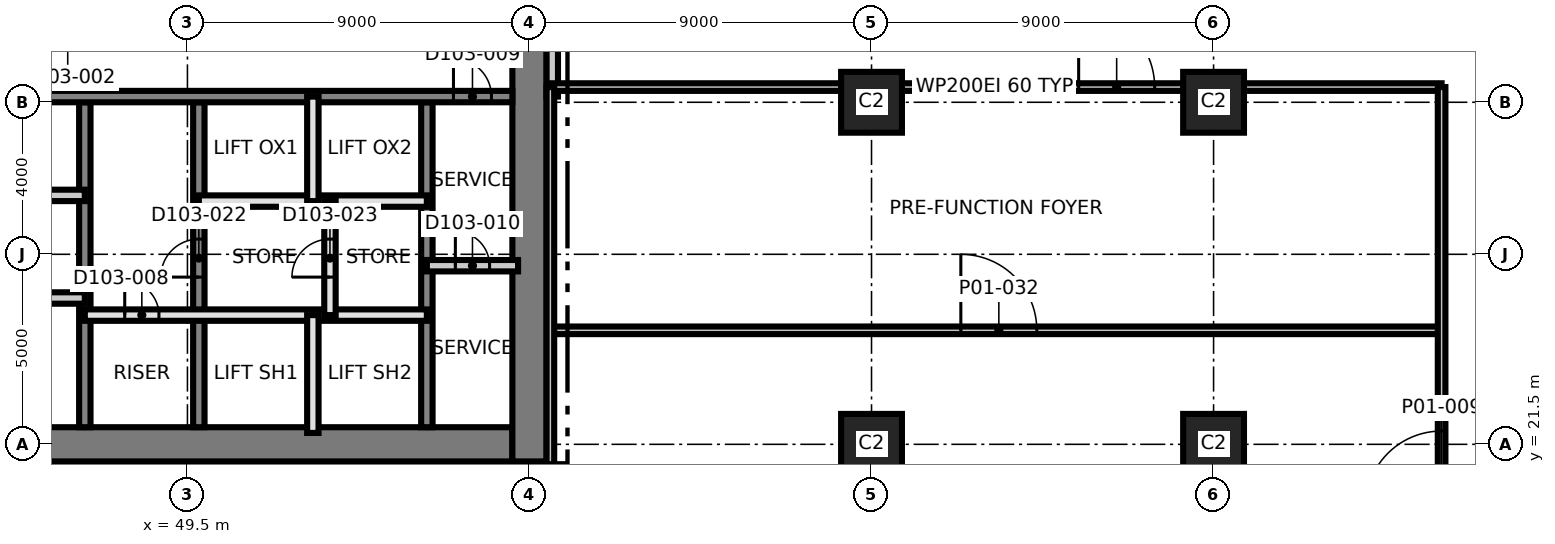
"""IFC4 building model, lengths in metres.
Left out: names, types, materials, properties, quantities, classifications, styles, units other than length and angle.
Written with IfcOpenShell. Run it as: python <this file> out.ifc"""

import sys

from ifc_helpers import new_model, si_unit, direction, frame, frame_2d, origin, origin_2d, place, context, subcontext, project, spatial, rectangle, extrude, element, fill, save


model = new_model("IFC4")
c1 = context("Model", 3, precision=1e-05, world=origin(), true_north=direction((0.0, 1.0)))
c2 = subcontext(c1, "Body", "Model", "MODEL_VIEW")
j1 = project(units=[si_unit("LENGTHUNIT", "METRE"), si_unit("PLANEANGLEUNIT", "RADIAN")], contexts=[c1])
p1 = place(None, origin())
s1 = spatial("IfcSite", under=j1, at=p1, CompositionType="ELEMENT")
p2 = place(p1, origin())
s2 = spatial("IfcBuilding", under=s1, at=p2, CompositionType="ELEMENT")
p3 = place(p2, frame((0.0, 0.0, 8.0)))
s3 = spatial("IfcBuildingStorey", under=s2, at=p3, CompositionType="ELEMENT", Elevation=8.0)
p4 = place(p3, frame((31.05, 21.5, 0.0), z_axis=(0.0, 0.0, 1.0), x_axis=(1.0, 0.0, 0.0)))
e1 = element("IfcWall", 1, at=p4, inside=s3, PredefinedType="SHEAR", context=c2, shape_type="SweptSolid", body=[
    extrude(rectangle(XDim=27.0, YDim=0.9, at=frame_2d((13.5, 0.0))), origin(), (0.0, 0.0, 1.0), 5.5),
])
p5 = place(p3, frame((58.5, 21.05, 0.0), z_axis=(0.0, 0.0, 1.0), x_axis=(0.0, 1.0, 0.0)))
e2 = element("IfcWall", 2, at=p5, inside=s3, PredefinedType="SHEAR", context=c2, shape_type="SweptSolid", body=[
    extrude(rectangle(XDim=18.9, YDim=0.9, at=frame_2d((9.45, 0.0))), origin(), (0.0, 0.0, 1.0), 5.5),
])
p6 = place(p3, frame((46.8, 21.95, 0.0), z_axis=(0.0, 0.0, 1.0), x_axis=(0.0, 1.0, 0.0)))
e3 = element("IfcWall", 3, at=p6, inside=s3, PredefinedType="SHEAR", context=c2, shape_type="SweptSolid", body=[
    extrude(rectangle(XDim=8.55, YDim=0.3, at=frame_2d((4.275, 0.0))), origin(), (0.0, 0.0, 1.0), 5.5),
])
p7 = place(p3, frame((49.8, 21.95, 0.0), z_axis=(0.0, 0.0, 1.0), x_axis=(0.0, 1.0, 0.0)))
e4 = element("IfcWall", 4, at=p7, inside=s3, PredefinedType="SHEAR", context=c2, shape_type="SweptSolid", body=[
    extrude(rectangle(XDim=8.55, YDim=0.3, at=frame_2d((4.275, 0.0))), origin(), (0.0, 0.0, 1.0), 5.5),
])
p8 = place(p7, frame((3.95, 0.0, 0.0)))
e5 = element("IfcOpeningElement", 5, at=p8, cuts=e4, PredefinedType="OPENING", context=c2, shape_type="SweptSolid", body=[
    extrude(rectangle(XDim=1.0, YDim=2.1, at=frame_2d((0.5, 1.05))), frame((0.0, 0.16, 0.0), z_axis=(0.0, -1.0, 0.0), x_axis=(1.0, 0.0, 0.0)), (0.0, 0.0, 1.0), 0.32),
])
p9 = place(p3, frame((55.8, 21.95, 0.0), z_axis=(0.0, 0.0, 1.0), x_axis=(0.0, 1.0, 0.0)))
e6 = element("IfcWall", 6, at=p9, inside=s3, PredefinedType="SHEAR", context=c2, shape_type="SweptSolid", body=[
    extrude(rectangle(XDim=8.55, YDim=0.3, at=frame_2d((4.275, 0.0))), origin(), (0.0, 0.0, 1.0), 5.5),
])
p10 = place(p3, frame((31.95, 30.65, 0.0), z_axis=(0.0, 0.0, 1.0), x_axis=(1.0, 0.0, 0.0)))
e7 = element("IfcWall", 7, at=p10, inside=s3, PredefinedType="SHEAR", context=c2, shape_type="SweptSolid", body=[
    extrude(rectangle(XDim=26.1, YDim=0.3, at=frame_2d((13.05, 0.0))), origin(), (0.0, 0.0, 1.0), 5.5),
])
p11 = place(p10, frame((24.55, 0.0, 0.0)))
e8 = element("IfcOpeningElement", 8, at=p11, cuts=e7, PredefinedType="OPENING", context=c2, shape_type="SweptSolid", body=[
    extrude(rectangle(XDim=1.0, YDim=2.1, at=frame_2d((0.5, 1.05))), frame((0.0, 0.16, 0.0), z_axis=(0.0, -1.0, 0.0), x_axis=(1.0, 0.0, 0.0)), (0.0, 0.0, 1.0), 0.32),
])
p12 = place(p10, frame((11.35, 0.0, 0.0)))
e9 = element("IfcOpeningElement", 9, at=p12, cuts=e7, PredefinedType="OPENING", context=c2, shape_type="SweptSolid", body=[
    extrude(rectangle(XDim=1.0, YDim=2.1, at=frame_2d((0.5, 1.05))), frame((0.0, 0.16, 0.0), z_axis=(0.0, -1.0, 0.0), x_axis=(1.0, 0.0, 0.0)), (0.0, 0.0, 1.0), 0.32),
])
for number, where, z_axis, x_axis in (
    (10, (67.5, 21.5, 0.0), (0.0, 0.0, 1.0), (1.0, 0.0, 0.0)),
    (11, (76.5, 21.5, 0.0), (0.0, 0.0, 1.0), (1.0, 0.0, 0.0)),
    (12, (67.5, 30.5, 0.0), (0.0, 0.0, 1.0), (1.0, 0.0, 0.0)),
    (13, (76.5, 30.5, 0.0), (0.0, 0.0, 1.0), (1.0, 0.0, 0.0)),
):
    element("IfcColumn", number, at=place(p3, frame(where, z_axis=z_axis, x_axis=x_axis)), inside=s3, PredefinedType="COLUMN", context=c2, shape_type="SweptSolid", body=[
        extrude(rectangle(XDim=1.6, YDim=1.6, at=origin_2d()), origin(), (0.0, 0.0, 1.0), 5.5),
    ])
p13 = place(p3, frame((46.8, 24.9, 0.0), z_axis=(0.0, 0.0, 1.0), x_axis=(1.0, 0.0, 0.0)))
e14 = element("IfcWall", 14, at=p13, inside=s3, PredefinedType="SOLIDWALL", context=c2, shape_type="SweptSolid", body=[
    extrude(rectangle(XDim=9.0, YDim=0.3, at=frame_2d((4.5, 0.0))), origin(), (0.0, 0.0, 1.0), 5.2),
])
p14 = place(p13, frame((1.05, 0.0, 0.0)))
e15 = element("IfcOpeningElement", 15, at=p14, cuts=e14, PredefinedType="OPENING", context=c2, shape_type="SweptSolid", body=[
    extrude(rectangle(XDim=0.9, YDim=2.1, at=frame_2d((0.45, 1.05))), frame((0.0, 0.16, 0.0), z_axis=(0.0, -1.0, 0.0), x_axis=(1.0, 0.0, 0.0)), (0.0, 0.0, 1.0), 0.32),
])
p15 = place(p3, frame((40.8, 25.35, 0.0), z_axis=(0.0, 0.0, 1.0), x_axis=(1.0, 0.0, 0.0)))
e16 = element("IfcWall", 16, at=p15, inside=s3, PredefinedType="PARTITIONING", context=c2, shape_type="SweptSolid", body=[
    extrude(rectangle(XDim=6.0, YDim=0.3, at=frame_2d((3.0, 0.0))), origin(), (0.0, 0.0, 1.0), 5.2),
])
p16 = place(p15, frame((2.5, 0.0, 0.0)))
e17 = element("IfcOpeningElement", 17, at=p16, cuts=e16, PredefinedType="OPENING", context=c2, shape_type="SweptSolid", body=[
    extrude(rectangle(XDim=1.0, YDim=2.1, at=frame_2d((0.5, 1.05))), frame((0.0, 0.16, 0.0), z_axis=(0.0, -1.0, 0.0), x_axis=(1.0, 0.0, 0.0)), (0.0, 0.0, 1.0), 0.32),
])
p17 = place(p3, frame((55.8, 26.2, 0.0), z_axis=(0.0, 0.0, 1.0), x_axis=(1.0, 0.0, 0.0)))
e18 = element("IfcWall", 18, at=p17, inside=s3, PredefinedType="PARTITIONING", context=c2, shape_type="SweptSolid", body=[
    extrude(rectangle(XDim=2.4, YDim=0.3, at=frame_2d((1.2, 0.0))), origin(), (0.0, 0.0, 1.0), 5.2),
])
p18 = place(p17, frame((0.75, 0.0, 0.0)))
e19 = element("IfcOpeningElement", 19, at=p18, cuts=e18, PredefinedType="OPENING", context=c2, shape_type="SweptSolid", body=[
    extrude(rectangle(XDim=0.9, YDim=2.1, at=frame_2d((0.45, 1.05))), frame((0.0, 0.16, 0.0), z_axis=(0.0, -1.0, 0.0), x_axis=(1.0, 0.0, 0.0)), (0.0, 0.0, 1.0), 0.32),
])
p19 = place(p3, frame((49.8, 27.9, 0.0), z_axis=(0.0, 0.0, 1.0), x_axis=(1.0, 0.0, 0.0)))
e20 = element("IfcWall", 20, at=p19, inside=s3, PredefinedType="SOLIDWALL", context=c2, shape_type="SweptSolid", body=[
    extrude(rectangle(XDim=6.0, YDim=0.3, at=frame_2d((3.0, 0.0))), origin(), (0.0, 0.0, 1.0), 5.2),
])
p20 = place(p3, frame((40.8, 28.05, 0.0), z_axis=(0.0, 0.0, 1.0), x_axis=(1.0, 0.0, 0.0)))
e21 = element("IfcWall", 21, at=p20, inside=s3, PredefinedType="PARTITIONING", context=c2, shape_type="SweptSolid", body=[
    extrude(rectangle(XDim=6.0, YDim=0.3, at=frame_2d((3.0, 0.0))), origin(), (0.0, 0.0, 1.0), 5.2),
])
p21 = place(p3, frame((52.8, 21.8, 0.0), z_axis=(0.0, 0.0, 1.0), x_axis=(0.0, 1.0, 0.0)))
e22 = element("IfcWall", 22, at=p21, inside=s3, PredefinedType="SOLIDWALL", context=c2, shape_type="SweptSolid", body=[
    extrude(rectangle(XDim=3.1, YDim=0.3, at=frame_2d((1.55, 0.0))), origin(), (0.0, 0.0, 1.0), 5.2),
])
p22 = place(p3, frame((52.8, 27.9, 0.0), z_axis=(0.0, 0.0, 1.0), x_axis=(0.0, 1.0, 0.0)))
e23 = element("IfcWall", 23, at=p22, inside=s3, PredefinedType="SOLIDWALL", context=c2, shape_type="SweptSolid", body=[
    extrude(rectangle(XDim=2.75, YDim=0.3, at=frame_2d((1.375, 0.0))), origin(), (0.0, 0.0, 1.0), 5.2),
])
p23 = place(p3, frame((53.25, 24.9, 0.0), z_axis=(0.0, 0.0, 1.0), x_axis=(0.0, 1.0, 0.0)))
e24 = element("IfcWall", 24, at=p23, inside=s3, PredefinedType="SOLIDWALL", context=c2, shape_type="SweptSolid", body=[
    extrude(rectangle(XDim=3.0, YDim=0.3, at=frame_2d((1.5, 0.0))), origin(), (0.0, 0.0, 1.0), 5.2),
])
p24 = place(p23, frame((1.0, 0.0, 0.0)))
e25 = element("IfcOpeningElement", 25, at=p24, cuts=e24, PredefinedType="OPENING", context=c2, shape_type="SweptSolid", body=[
    extrude(rectangle(XDim=1.0, YDim=2.1, at=frame_2d((0.5, 1.05))), frame((0.0, 0.16, 0.0), z_axis=(0.0, -1.0, 0.0), x_axis=(1.0, 0.0, 0.0)), (0.0, 0.0, 1.0), 0.32),
])
p25 = place(p3, frame((59.1, 30.65, 0.0), z_axis=(0.0, 0.0, 1.0), x_axis=(0.0, 1.0, 0.0)))
e26 = element("IfcWall", 26, at=p25, inside=s3, PredefinedType="PARTITIONING", context=c2, shape_type="SweptSolid", body=[
    extrude(rectangle(XDim=2.7, YDim=0.3, at=frame_2d((1.35, 0.0))), origin(), (0.0, 0.0, 1.0), 5.2),
])
p26 = place(p3, frame((59.05, 24.5, 0.0), z_axis=(0.0, 0.0, 1.0), x_axis=(1.0, 0.0, 0.0)))
e27 = element("IfcWall", 27, at=p26, inside=s3, PredefinedType="PARTITIONING", context=c2, shape_type="SweptSolid", body=[
    extrude(rectangle(XDim=23.45, YDim=0.2, at=frame_2d((11.725, 0.0))), origin(), (0.0, 0.0, 1.0), 5.2),
])
p27 = place(p26, frame((10.8, 0.0, 0.0)))
e28 = element("IfcOpeningElement", 28, at=p27, cuts=e27, PredefinedType="OPENING", context=c2, shape_type="SweptSolid", body=[
    extrude(rectangle(XDim=2.0, YDim=2.1, at=frame_2d((1.0, 1.05))), frame((0.0, 0.11, 0.0), z_axis=(0.0, -1.0, 0.0), x_axis=(1.0, 0.0, 0.0)), (0.0, 0.0, 1.0), 0.22),
])
p28 = place(p3, frame((58.97, 30.9, 0.0), z_axis=(0.0, 0.0, 1.0), x_axis=(1.0, 0.0, 0.0)))
e29 = element("IfcWall", 29, at=p28, inside=s3, PredefinedType="PARTITIONING", context=c2, shape_type="SweptSolid", body=[
    extrude(rectangle(XDim=23.53, YDim=0.2, at=frame_2d((11.765, 0.0))), origin(), (0.0, 0.0, 1.0), 5.2),
])
p29 = place(p28, frame((13.98, 0.0, 0.0)))
e30 = element("IfcOpeningElement", 30, at=p29, cuts=e29, PredefinedType="OPENING", context=c2, shape_type="SweptSolid", body=[
    extrude(rectangle(XDim=2.0, YDim=2.4, at=frame_2d((1.0, 1.2))), frame((0.0, 0.11, 0.0), z_axis=(0.0, -1.0, 0.0), x_axis=(1.0, 0.0, 0.0)), (0.0, 0.0, 1.0), 0.22),
])
p30 = place(p3, frame((59.05, 11.07, 0.0), z_axis=(0.0, 0.0, 1.0), x_axis=(0.0, 1.0, 0.0)))
e31 = element("IfcWall", 31, at=p30, inside=s3, PredefinedType="PARTITIONING", context=c2, shape_type="SweptSolid", body=[
    extrude(rectangle(XDim=19.83, YDim=0.2, at=frame_2d((9.915, 0.0))), origin(), (0.0, 0.0, 1.0), 5.2),
])
p31 = place(p3, frame((82.5, 11.07, 0.0), z_axis=(0.0, 0.0, 1.0), x_axis=(0.0, 1.0, 0.0)))
e32 = element("IfcWall", 32, at=p31, inside=s3, PredefinedType="PARTITIONING", context=c2, shape_type="SweptSolid", body=[
    extrude(rectangle(XDim=19.83, YDim=0.2, at=frame_2d((9.915, 0.0))), origin(), (0.0, 0.0, 1.0), 5.2),
])
p32 = place(p31, frame((8.78, 0.0, 0.0)))
e33 = element("IfcOpeningElement", 33, at=p32, cuts=e32, PredefinedType="OPENING", context=c2, shape_type="SweptSolid", body=[
    extrude(rectangle(XDim=2.0, YDim=2.4, at=frame_2d((1.0, 1.2))), frame((0.0, 0.11, 0.0), z_axis=(0.0, -1.0, 0.0), x_axis=(1.0, 0.0, 0.0)), (0.0, 0.0, 1.0), 0.22),
])
p33 = place(p14, origin())
e34 = element("IfcDoor", 34, at=p33, inside=s3, OperationType="SINGLE_SWING_RIGHT", PredefinedType="DOOR", context=c2, shape_type="SweptSolid", body=[
    extrude(rectangle(XDim=0.9, YDim=2.1, at=frame_2d((0.45, 1.05))), frame((0.0, 0.025, 0.0), z_axis=(0.0, -1.0, 0.0), x_axis=(1.0, 0.0, 0.0)), (0.0, 0.0, 1.0), 0.05),
])
fill(e15, e34)
p34 = place(p11, origin())
e35 = element("IfcDoor", 35, at=p34, inside=s3, OperationType="SINGLE_SWING_LEFT", PredefinedType="DOOR", context=c2, shape_type="SweptSolid", body=[
    extrude(rectangle(XDim=1.0, YDim=2.1, at=frame_2d((0.5, 1.05))), frame((0.0, 0.025, 0.0), z_axis=(0.0, -1.0, 0.0), x_axis=(1.0, 0.0, 0.0)), (0.0, 0.0, 1.0), 0.05),
])
fill(e8, e35)
p35 = place(p18, origin())
e36 = element("IfcDoor", 36, at=p35, inside=s3, OperationType="SINGLE_SWING_RIGHT", PredefinedType="DOOR", context=c2, shape_type="SweptSolid", body=[
    extrude(rectangle(XDim=0.9, YDim=2.1, at=frame_2d((0.45, 1.05))), frame((0.0, 0.025, 0.0), z_axis=(0.0, -1.0, 0.0), x_axis=(1.0, 0.0, 0.0)), (0.0, 0.0, 1.0), 0.05),
])
fill(e19, e36)
p36 = place(p8, origin())
e37 = element("IfcDoor", 37, at=p36, inside=s3, OperationType="SINGLE_SWING_RIGHT", PredefinedType="DOOR", context=c2, shape_type="SweptSolid", body=[
    extrude(rectangle(XDim=1.0, YDim=2.1, at=frame_2d((0.5, 1.05))), frame((0.0, 0.025, 0.0), z_axis=(0.0, -1.0, 0.0), x_axis=(1.0, 0.0, 0.0)), (0.0, 0.0, 1.0), 0.05),
])
fill(e5, e37)
p37 = place(p24, origin())
e38 = element("IfcDoor", 38, at=p37, inside=s3, OperationType="SINGLE_SWING_RIGHT", PredefinedType="DOOR", context=c2, shape_type="SweptSolid", body=[
    extrude(rectangle(XDim=1.0, YDim=2.1, at=frame_2d((0.5, 1.05))), frame((0.0, 0.025, 0.0), z_axis=(0.0, -1.0, 0.0), x_axis=(1.0, 0.0, 0.0)), (0.0, 0.0, 1.0), 0.05),
])
fill(e25, e38)
p38 = place(p32, origin())
e39 = element("IfcDoor", 39, at=p38, inside=s3, OperationType="SINGLE_SWING_LEFT", PredefinedType="DOOR", context=c2, shape_type="SweptSolid", body=[
    extrude(rectangle(XDim=2.0, YDim=2.4, at=frame_2d((1.0, 1.2))), frame((0.0, 0.025, 0.0), z_axis=(0.0, -1.0, 0.0), x_axis=(1.0, 0.0, 0.0)), (0.0, 0.0, 1.0), 0.05),
])
fill(e33, e39)
p39 = place(p29, origin())
e40 = element("IfcDoor", 40, at=p39, inside=s3, OperationType="SINGLE_SWING_RIGHT", PredefinedType="DOOR", context=c2, shape_type="SweptSolid", body=[
    extrude(rectangle(XDim=2.0, YDim=2.4, at=frame_2d((1.0, 1.2))), frame((0.0, 0.025, 0.0), z_axis=(0.0, -1.0, 0.0), x_axis=(1.0, 0.0, 0.0)), (0.0, 0.0, 1.0), 0.05),
])
fill(e30, e40)
p40 = place(p27, origin())
e41 = element("IfcDoor", 41, at=p40, inside=s3, OperationType="SINGLE_SWING_RIGHT", PredefinedType="DOOR", context=c2, shape_type="SweptSolid", body=[
    extrude(rectangle(XDim=2.0, YDim=2.1, at=frame_2d((1.0, 1.05))), frame((0.0, 0.025, 0.0), z_axis=(0.0, -1.0, 0.0), x_axis=(1.0, 0.0, 0.0)), (0.0, 0.0, 1.0), 0.05),
])
fill(e28, e41)
save(model, sys.argv[1])
